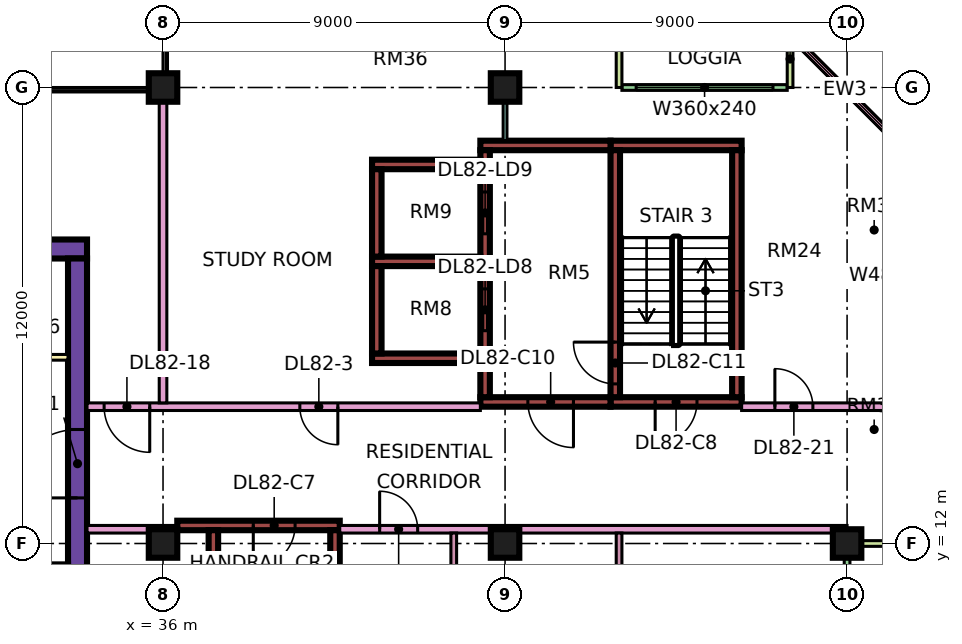
"""IFC4 building model, lengths in metres.
Left out: names, types, materials, properties, quantities, classifications, styles, units other than length and angle.
Written with IfcOpenShell. Run it as: python <this file> out.ifc"""

import sys

from ifc_helpers import new_model, si_unit, direction, frame, frame_2d, origin, origin_2d, place, context, subcontext, project, spatial, rectangle, extrude, element, fill, save


model = new_model("IFC4")
c1 = context("Model", 3, precision=1e-05, world=origin(), true_north=direction((0.0, 1.0)))
c2 = subcontext(c1, "Body", "Model", "MODEL_VIEW")
j1 = project(units=[si_unit("LENGTHUNIT", "METRE"), si_unit("PLANEANGLEUNIT", "RADIAN")], contexts=[c1])
p1 = place(None, origin())
s1 = spatial("IfcSite", under=j1, at=p1, CompositionType="ELEMENT")
p2 = place(p1, origin())
s2 = spatial("IfcBuilding", under=s1, at=p2, CompositionType="ELEMENT")
p3 = place(p2, frame((0.0, 0.0, 353.9)))
s3 = spatial("IfcBuildingStorey", under=s2, at=p3, CompositionType="ELEMENT", Elevation=353.9)
for number, where, z_axis, x_axis in (
    (1, (36.0, 12.0, 0.0), (0.0, 0.0, 1.0), (1.0, 0.0, 0.0)),
    (2, (36.0, 24.0, 0.0), (0.0, 0.0, 1.0), (1.0, 0.0, 0.0)),
    (3, (45.0, 12.0, 0.0), (0.0, 0.0, 1.0), (1.0, 0.0, 0.0)),
    (4, (45.0, 24.0, 0.0), (0.0, 0.0, 1.0), (1.0, 0.0, 0.0)),
    (5, (54.0, 12.0, 0.0), (0.0, 0.0, 1.0), (1.0, 0.0, 0.0)),
):
    element("IfcColumn", number, at=place(p3, frame(where, z_axis=z_axis, x_axis=x_axis)), inside=s3, PredefinedType="COLUMN", context=c2, shape_type="SweptSolid", body=[
        extrude(rectangle(XDim=0.75, YDim=0.75, at=origin_2d()), origin(), (0.0, 0.0, 1.0), 3.75),
    ])
p4 = place(p3, frame((9.0, 19.75, 0.0), z_axis=(0.0, 0.0, 1.0), x_axis=(1.0, 0.0, 0.0)))
e6 = element("IfcWall", 6, at=p4, inside=s3, PredefinedType="SHEAR", context=c2, shape_type="SweptSolid", body=[
    extrude(rectangle(XDim=25.0, YDim=0.5, at=frame_2d((12.5, 0.0))), origin(), (0.0, 0.0, 1.0), 3.75),
])
p5 = place(p4, frame((19.1, 0.0, 0.0)))
e7 = element("IfcOpeningElement", 7, at=p5, cuts=e6, PredefinedType="OPENING", context=c2, shape_type="SweptSolid", body=[
    extrude(rectangle(XDim=1.8, YDim=2.4, at=frame_2d((0.9, 1.2))), frame((0.0, 0.26, 0.0), z_axis=(0.0, -1.0, 0.0), x_axis=(1.0, 0.0, 0.0)), (0.0, 0.0, 1.0), 0.52),
])
p6 = place(p3, frame((33.75, 7.5, 0.0), z_axis=(0.0, 0.0, 1.0), x_axis=(0.0, 1.0, 0.0)))
e8 = element("IfcWall", 8, at=p6, inside=s3, PredefinedType="SHEAR", context=c2, shape_type="SweptSolid", body=[
    extrude(rectangle(XDim=12.0, YDim=0.5, at=frame_2d((6.0, 0.0))), origin(), (0.0, 0.0, 1.0), 3.75),
])
p7 = place(p6, frame((5.7, 0.0, 0.0)))
e9 = element("IfcOpeningElement", 9, at=p7, cuts=e8, PredefinedType="OPENING", context=c2, shape_type="SweptSolid", body=[
    extrude(rectangle(XDim=1.8, YDim=2.4, at=frame_2d((0.9, 1.2))), frame((0.0, 0.26, 0.0), z_axis=(0.0, -1.0, 0.0), x_axis=(1.0, 0.0, 0.0)), (0.0, 0.0, 1.0), 0.52),
])
p8 = place(p3, frame((36.375, 12.475, 0.0), z_axis=(0.0, 0.0, 1.0), x_axis=(1.0, 0.0, 0.0)))
e10 = element("IfcWall", 10, at=p8, inside=s3, PredefinedType="SHEAR", context=c2, shape_type="SweptSolid", body=[
    extrude(rectangle(XDim=4.275, YDim=0.25, at=frame_2d((2.137, 0.0))), origin(), (0.0, 0.0, 1.0), 3.75),
])
p9 = place(p8, frame((2.0, 0.0, 0.0)))
e11 = element("IfcOpeningElement", 11, at=p9, cuts=e10, PredefinedType="OPENING", context=c2, shape_type="SweptSolid", body=[
    extrude(rectangle(XDim=1.1, YDim=2.2, at=frame_2d((0.55, 1.1))), frame((0.0, 0.135, 0.0), z_axis=(0.0, -1.0, 0.0), x_axis=(1.0, 0.0, 0.0)), (0.0, 0.0, 1.0), 0.27),
])
for number, where, z_axis, x_axis in (
    (12, (37.325, 5.85, 0.0), (0.0, 0.0, 1.0), (0.0, 1.0, 0.0)),
    (13, (40.525, 5.85, 0.0), (0.0, 0.0, 1.0), (0.0, 1.0, 0.0)),
):
    element("IfcWall", number, at=place(p3, frame(where, z_axis=z_axis, x_axis=x_axis)), inside=s3, PredefinedType="SHEAR", context=c2, shape_type="SweptSolid", body=[
        extrude(rectangle(XDim=6.5, YDim=0.25, at=frame_2d((3.25, 0.0))), origin(), (0.0, 0.0, 1.0), 3.75),
    ])
p10 = place(p3, frame((47.775, 15.725, 0.0), z_axis=(0.0, 0.0, 1.0), x_axis=(1.0, 0.0, 0.0)))
e14 = element("IfcWall", 14, at=p10, inside=s3, PredefinedType="SHEAR", context=c2, shape_type="SweptSolid", body=[
    extrude(rectangle(XDim=3.45, YDim=0.25, at=frame_2d((1.725, 0.0))), origin(), (0.0, 0.0, 1.0), 3.75),
])
p11 = place(p10, frame((1.175, 0.0, 0.0)))
e15 = element("IfcOpeningElement", 15, at=p11, cuts=e14, PredefinedType="OPENING", context=c2, shape_type="SweptSolid", body=[
    extrude(rectangle(XDim=1.1, YDim=2.2, at=frame_2d((0.55, 1.1))), frame((0.0, 0.135, 0.0), z_axis=(0.0, -1.0, 0.0), x_axis=(1.0, 0.0, 0.0)), (0.0, 0.0, 1.0), 0.27),
])
p12 = place(p3, frame((47.775, 22.475, 0.0), z_axis=(0.0, 0.0, 1.0), x_axis=(1.0, 0.0, 0.0)))
e16 = element("IfcWall", 16, at=p12, inside=s3, PredefinedType="SHEAR", context=c2, shape_type="SweptSolid", body=[
    extrude(rectangle(XDim=3.45, YDim=0.25, at=frame_2d((1.725, 0.0))), origin(), (0.0, 0.0, 1.0), 3.75),
])
p13 = place(p3, frame((47.9, 15.85, 0.0), z_axis=(0.0, 0.0, 1.0), x_axis=(0.0, 1.0, 0.0)))
e17 = element("IfcWall", 17, at=p13, inside=s3, PredefinedType="SHEAR", context=c2, shape_type="SweptSolid", body=[
    extrude(rectangle(XDim=6.5, YDim=0.25, at=frame_2d((3.25, 0.0))), origin(), (0.0, 0.0, 1.0), 3.75),
])
p14 = place(p13, frame((0.35, 0.0, 0.0)))
e18 = element("IfcOpeningElement", 18, at=p14, cuts=e17, PredefinedType="OPENING", context=c2, shape_type="SweptSolid", body=[
    extrude(rectangle(XDim=1.1, YDim=2.2, at=frame_2d((0.55, 1.1))), frame((0.0, 0.135, 0.0), z_axis=(0.0, -1.0, 0.0), x_axis=(1.0, 0.0, 0.0)), (0.0, 0.0, 1.0), 0.27),
])
p15 = place(p3, frame((51.1, 15.85, 0.0), z_axis=(0.0, 0.0, 1.0), x_axis=(0.0, 1.0, 0.0)))
e19 = element("IfcWall", 19, at=p15, inside=s3, PredefinedType="SHEAR", context=c2, shape_type="SweptSolid", body=[
    extrude(rectangle(XDim=6.5, YDim=0.25, at=frame_2d((3.25, 0.0))), origin(), (0.0, 0.0, 1.0), 3.75),
])
p16 = place(p3, frame((44.35, 15.725, 0.0), z_axis=(0.0, 0.0, 1.0), x_axis=(1.0, 0.0, 0.0)))
e20 = element("IfcWall", 20, at=p16, inside=s3, PredefinedType="SHEAR", context=c2, shape_type="SweptSolid", body=[
    extrude(rectangle(XDim=3.425, YDim=0.25, at=frame_2d((1.712, 0.0))), origin(), (0.0, 0.0, 1.0), 3.75),
])
p17 = place(p16, frame((1.25, 0.0, 0.0)))
e21 = element("IfcOpeningElement", 21, at=p17, cuts=e20, PredefinedType="OPENING", context=c2, shape_type="SweptSolid", body=[
    extrude(rectangle(XDim=1.2, YDim=2.2, at=frame_2d((0.6, 1.1))), frame((0.0, 0.135, 0.0), z_axis=(0.0, -1.0, 0.0), x_axis=(1.0, 0.0, 0.0)), (0.0, 0.0, 1.0), 0.27),
])
p18 = place(p3, frame((44.35, 22.475, 0.0), z_axis=(0.0, 0.0, 1.0), x_axis=(1.0, 0.0, 0.0)))
e22 = element("IfcWall", 22, at=p18, inside=s3, PredefinedType="SHEAR", context=c2, shape_type="SweptSolid", body=[
    extrude(rectangle(XDim=3.425, YDim=0.25, at=frame_2d((1.712, 0.0))), origin(), (0.0, 0.0, 1.0), 3.75),
])
p19 = place(p3, frame((44.475, 15.85, 0.0), z_axis=(0.0, 0.0, 1.0), x_axis=(0.0, 1.0, 0.0)))
e23 = element("IfcWall", 23, at=p19, inside=s3, PredefinedType="SHEAR", context=c2, shape_type="SweptSolid", body=[
    extrude(rectangle(XDim=6.5, YDim=0.25, at=frame_2d((3.25, 0.0))), origin(), (0.0, 0.0, 1.0), 3.75),
])
p20 = place(p19, frame((1.75, 0.0, 0.0)))
e24 = element("IfcOpeningElement", 24, at=p20, cuts=e23, PredefinedType="OPENING", context=c2, shape_type="SweptSolid", body=[
    extrude(rectangle(XDim=1.1, YDim=2.2, at=frame_2d((0.55, 1.1))), frame((0.0, 0.135, 0.0), z_axis=(0.0, -1.0, 0.0), x_axis=(1.0, 0.0, 0.0)), (0.0, 0.0, 1.0), 0.27),
])
p21 = place(p19, frame((4.3, 0.0, 0.0)))
e25 = element("IfcOpeningElement", 25, at=p21, cuts=e23, PredefinedType="OPENING", context=c2, shape_type="SweptSolid", body=[
    extrude(rectangle(XDim=1.1, YDim=2.2, at=frame_2d((0.55, 1.1))), frame((0.0, 0.135, 0.0), z_axis=(0.0, -1.0, 0.0), x_axis=(1.0, 0.0, 0.0)), (0.0, 0.0, 1.0), 0.27),
])
for number, where, z_axis, x_axis in (
    (26, (41.5, 16.875, 0.0), (0.0, 0.0, 1.0), (1.0, 0.0, 0.0)),
    (27, (41.5, 19.425, 0.0), (0.0, 0.0, 1.0), (1.0, 0.0, 0.0)),
    (28, (41.5, 21.975, 0.0), (0.0, 0.0, 1.0), (1.0, 0.0, 0.0)),
):
    element("IfcWall", number, at=place(p3, frame(where, z_axis=z_axis, x_axis=x_axis)), inside=s3, PredefinedType="SHEAR", context=c2, shape_type="SweptSolid", body=[
        extrude(rectangle(XDim=2.85, YDim=0.25, at=frame_2d((1.425, 0.0))), origin(), (0.0, 0.0, 1.0), 3.75),
    ])
for number, where, z_axis, x_axis in (
    (29, (41.625, 17.0, 0.0), (0.0, 0.0, 1.0), (0.0, 1.0, 0.0)),
    (30, (41.625, 19.55, 0.0), (0.0, 0.0, 1.0), (0.0, 1.0, 0.0)),
):
    element("IfcWall", number, at=place(p3, frame(where, z_axis=z_axis, x_axis=x_axis)), inside=s3, PredefinedType="SHEAR", context=c2, shape_type="SweptSolid", body=[
        extrude(rectangle(XDim=2.3, YDim=0.25, at=frame_2d((1.15, 0.0))), origin(), (0.0, 0.0, 1.0), 3.75),
    ])
p22 = place(p3, frame((52.425, 24.0, 0.0), z_axis=(0.0, 0.0, 1.0), x_axis=(-1.0, 0.0, 0.0)))
e31 = element("IfcWall", 31, at=p22, inside=s3, PredefinedType="SOLIDWALL", context=c2, shape_type="SweptSolid", body=[
    extrude(rectangle(XDim=4.35, YDim=0.15, at=frame_2d((2.175, 0.0))), origin(), (0.0, 0.0, 1.0), 3.35),
])
p23 = place(p22, frame((0.375, 0.0, 0.45)))
e32 = element("IfcOpeningElement", 32, at=p23, cuts=e31, PredefinedType="OPENING", context=c2, shape_type="SweptSolid", body=[
    extrude(rectangle(XDim=3.6, YDim=2.4, at=frame_2d((1.8, 1.2))), frame((0.0, 0.085, 0.0), z_axis=(0.0, -1.0, 0.0), x_axis=(1.0, 0.0, 0.0)), (0.0, 0.0, 1.0), 0.17),
])
for number, where, z_axis, x_axis in (
    (33, (52.5, 25.5, 0.0), (0.0, 0.0, 1.0), (0.0, -1.0, 0.0)),
    (34, (48.0, 25.5, 0.0), (0.0, 0.0, 1.0), (0.0, -1.0, 0.0)),
):
    element("IfcWall", number, at=place(p3, frame(where, z_axis=z_axis, x_axis=x_axis)), inside=s3, PredefinedType="SOLIDWALL", context=c2, shape_type="SweptSolid", body=[
        extrude(rectangle(XDim=1.5, YDim=0.15, at=frame_2d((0.75, 0.0))), origin(), (0.0, 0.0, 1.0), 3.35),
    ])
p24 = place(p3, frame((54.0, 1.575, 0.0), z_axis=(0.0, 0.0, 1.0), x_axis=(0.0, 1.0, 0.0)))
e35 = element("IfcWall", 35, at=p24, inside=s3, PredefinedType="SOLIDWALL", context=c2, shape_type="SweptSolid", body=[
    extrude(rectangle(XDim=10.35, YDim=0.15, at=frame_2d((5.175, 0.0))), origin(), (0.0, 0.0, 1.0), 3.35),
])
p25 = place(p24, frame((0.663, 0.0, 0.0)))
e36 = element("IfcOpeningElement", 36, at=p25, cuts=e35, PredefinedType="OPENING", context=c2, shape_type="SweptSolid", body=[
    extrude(rectangle(XDim=1.8, YDim=2.4, at=frame_2d((0.9, 1.2))), frame((0.0, 0.085, 0.0), z_axis=(0.0, -1.0, 0.0), x_axis=(1.0, 0.0, 0.0)), (0.0, 0.0, 1.0), 0.17),
])
p26 = place(p24, frame((5.637, 0.0, 0.45)))
e37 = element("IfcOpeningElement", 37, at=p26, cuts=e35, PredefinedType="OPENING", context=c2, shape_type="SweptSolid", body=[
    extrude(rectangle(XDim=3.0, YDim=2.4, at=frame_2d((1.5, 1.2))), frame((0.0, 0.085, 0.0), z_axis=(0.0, -1.0, 0.0), x_axis=(1.0, 0.0, 0.0)), (0.0, 0.0, 1.0), 0.17),
])
p27 = place(p3, frame((55.5, 12.0, 0.0), z_axis=(0.0, 0.0, 1.0), x_axis=(-1.0, 0.0, 0.0)))
e38 = element("IfcWall", 38, at=p27, inside=s3, PredefinedType="SOLIDWALL", context=c2, shape_type="SweptSolid", body=[
    extrude(rectangle(XDim=1.5, YDim=0.15, at=frame_2d((0.75, 0.0))), origin(), (0.0, 0.0, 1.0), 3.35),
])
p28 = place(p3, frame((55.447, 22.447, 0.0), z_axis=(0.0, 0.0, 1.0), x_axis=(-0.707106781187, 0.707106781187, 0.0)))
e39 = element("IfcWall", 39, at=p28, inside=s3, PredefinedType="SOLIDWALL", context=c2, shape_type="SweptSolid", body=[
    extrude(rectangle(XDim=4.243, YDim=0.15, at=frame_2d((2.121, 0.0))), origin(), (0.0, 0.0, 1.0), 3.35),
])
p29 = place(p28, frame((0.621, 0.0, 0.45)))
e40 = element("IfcOpeningElement", 40, at=p29, cuts=e39, PredefinedType="OPENING", context=c2, shape_type="SweptSolid", body=[
    extrude(rectangle(XDim=3.0, YDim=2.4, at=frame_2d((1.5, 1.2))), frame((0.0, 0.085, 0.0), z_axis=(0.0, -1.0, 0.0), x_axis=(1.0, 0.0, 0.0)), (0.0, 0.0, 1.0), 0.17),
])
p30 = place(p3, frame((31.1, 16.9, 0.0), z_axis=(0.0, 0.0, 1.0), x_axis=(1.0, 0.0, 0.0)))
e41 = element("IfcWall", 41, at=p30, inside=s3, PredefinedType="PARTITIONING", context=c2, shape_type="SweptSolid", body=[
    extrude(rectangle(XDim=2.4, YDim=0.15, at=frame_2d((1.2, 0.0))), origin(), (0.0, 0.0, 1.0), 3.35),
])
p31 = place(p3, frame((34.0, 12.375, 0.0), z_axis=(0.0, 0.0, 1.0), x_axis=(1.0, 0.0, 0.0)))
e42 = element("IfcWall", 42, at=p31, inside=s3, PredefinedType="PARTITIONING", context=c2, shape_type="SweptSolid", body=[
    extrude(rectangle(XDim=2.376, YDim=0.2, at=frame_2d((1.188, 0.0))), origin(), (0.0, 0.0, 1.0), 3.35),
])
p32 = place(p3, frame((34.0, 15.6, 0.0), z_axis=(0.0, 0.0, 1.0), x_axis=(1.0, 0.0, 0.0)))
e43 = element("IfcWall", 43, at=p32, inside=s3, PredefinedType="PARTITIONING", context=c2, shape_type="SweptSolid", body=[
    extrude(rectangle(XDim=10.35, YDim=0.2, at=frame_2d((5.175, 0.0))), origin(), (0.0, 0.0, 1.0), 3.35),
])
p33 = place(p32, frame((5.6, 0.0, 0.0)))
e44 = element("IfcOpeningElement", 44, at=p33, cuts=e43, PredefinedType="OPENING", context=c2, shape_type="SweptSolid", body=[
    extrude(rectangle(XDim=1.0, YDim=2.1, at=frame_2d((0.5, 1.05))), frame((0.0, 0.11, 0.0), z_axis=(0.0, -1.0, 0.0), x_axis=(1.0, 0.0, 0.0)), (0.0, 0.0, 1.0), 0.22),
])
p34 = place(p32, frame((0.45, 0.0, 0.0)))
e45 = element("IfcOpeningElement", 45, at=p34, cuts=e43, PredefinedType="OPENING", context=c2, shape_type="SweptSolid", body=[
    extrude(rectangle(XDim=1.2, YDim=2.1, at=frame_2d((0.6, 1.05))), frame((0.0, 0.11, 0.0), z_axis=(0.0, -1.0, 0.0), x_axis=(1.0, 0.0, 0.0)), (0.0, 0.0, 1.0), 0.22),
])
p35 = place(p3, frame((36.0, 15.7, 0.0), z_axis=(0.0, 0.0, 1.0), x_axis=(0.0, 1.0, 0.0)))
e46 = element("IfcWall", 46, at=p35, inside=s3, PredefinedType="PARTITIONING", context=c2, shape_type="SweptSolid", body=[
    extrude(rectangle(XDim=8.3, YDim=0.2, at=frame_2d((4.15, 0.0))), origin(), (0.0, 0.0, 1.0), 3.35),
])
p36 = place(p3, frame((40.65, 12.375, 0.0), z_axis=(0.0, 0.0, 1.0), x_axis=(1.0, 0.0, 0.0)))
e47 = element("IfcWall", 47, at=p36, inside=s3, PredefinedType="PARTITIONING", context=c2, shape_type="SweptSolid", body=[
    extrude(rectangle(XDim=13.35, YDim=0.2, at=frame_2d((6.675, 0.0))), origin(), (0.0, 0.0, 1.0), 3.35),
])
p37 = place(p36, frame((1.05, 0.0, 0.0)))
e48 = element("IfcOpeningElement", 48, at=p37, cuts=e47, PredefinedType="OPENING", context=c2, shape_type="SweptSolid", body=[
    extrude(rectangle(XDim=1.0, YDim=2.1, at=frame_2d((0.5, 1.05))), frame((0.0, 0.11, 0.0), z_axis=(0.0, -1.0, 0.0), x_axis=(1.0, 0.0, 0.0)), (0.0, 0.0, 1.0), 0.22),
])
p38 = place(p3, frame((43.65, 5.975, 0.0), z_axis=(0.0, 0.0, 1.0), x_axis=(0.0, 1.0, 0.0)))
e49 = element("IfcWall", 49, at=p38, inside=s3, PredefinedType="PARTITIONING", context=c2, shape_type="SweptSolid", body=[
    extrude(rectangle(XDim=6.3, YDim=0.15, at=frame_2d((3.15, 0.0))), origin(), (0.0, 0.0, 1.0), 3.35),
])
p39 = place(p38, frame((4.275, 0.0, 0.0)))
e50 = element("IfcOpeningElement", 50, at=p39, cuts=e49, PredefinedType="OPENING", context=c2, shape_type="SweptSolid", body=[
    extrude(rectangle(XDim=0.9, YDim=2.1, at=frame_2d((0.45, 1.05))), frame((0.0, 0.085, 0.0), z_axis=(0.0, -1.0, 0.0), x_axis=(1.0, 0.0, 0.0)), (0.0, 0.0, 1.0), 0.17),
])
p40 = place(p3, frame((45.0, 22.6, 0.0), z_axis=(0.0, 0.0, 1.0), x_axis=(0.0, 1.0, 0.0)))
e51 = element("IfcWall", 51, at=p40, inside=s3, PredefinedType="PARTITIONING", context=c2, shape_type="SweptSolid", body=[
    extrude(rectangle(XDim=1.4, YDim=0.1, at=frame_2d((0.7, 0.0))), origin(), (0.0, 0.0, 1.0), 3.35),
])
p41 = place(p3, frame((48.0, 5.975, 0.0), z_axis=(0.0, 0.0, 1.0), x_axis=(0.0, 1.0, 0.0)))
e52 = element("IfcWall", 52, at=p41, inside=s3, PredefinedType="PARTITIONING", context=c2, shape_type="SweptSolid", body=[
    extrude(rectangle(XDim=6.3, YDim=0.15, at=frame_2d((3.15, 0.0))), origin(), (0.0, 0.0, 1.0), 3.35),
])
p42 = place(p3, frame((51.225, 15.6, 0.0), z_axis=(0.0, 0.0, 1.0), x_axis=(1.0, 0.0, 0.0)))
e53 = element("IfcWall", 53, at=p42, inside=s3, PredefinedType="PARTITIONING", context=c2, shape_type="SweptSolid", body=[
    extrude(rectangle(XDim=4.125, YDim=0.2, at=frame_2d((2.062, 0.0))), origin(), (0.0, 0.0, 1.0), 3.35),
])
p43 = place(p42, frame((0.875, 0.0, 0.0)))
e54 = element("IfcOpeningElement", 54, at=p43, cuts=e53, PredefinedType="OPENING", context=c2, shape_type="SweptSolid", body=[
    extrude(rectangle(XDim=1.0, YDim=2.1, at=frame_2d((0.5, 1.05))), frame((0.0, 0.11, 0.0), z_axis=(0.0, -1.0, 0.0), x_axis=(1.0, 0.0, 0.0)), (0.0, 0.0, 1.0), 0.22),
])
p44 = place(p23, origin())
e55 = element("IfcWindow", 55, at=p44, inside=s3, PartitioningType="SINGLE_PANEL", PredefinedType="WINDOW", context=c2, shape_type="SweptSolid", body=[
    extrude(rectangle(XDim=3.6, YDim=2.4, at=frame_2d((1.8, 1.2))), frame((0.0, 0.03, 0.0), z_axis=(0.0, -1.0, 0.0), x_axis=(1.0, 0.0, 0.0)), (0.0, 0.0, 1.0), 0.06),
])
fill(e32, e55)
p45 = place(p29, origin())
e56 = element("IfcWindow", 56, at=p45, inside=s3, PartitioningType="SINGLE_PANEL", PredefinedType="WINDOW", context=c2, shape_type="SweptSolid", body=[
    extrude(rectangle(XDim=3.0, YDim=2.4, at=frame_2d((1.5, 1.2))), frame((0.0, 0.03, 0.0), z_axis=(0.0, -1.0, 0.0), x_axis=(1.0, 0.0, 0.0)), (0.0, 0.0, 1.0), 0.06),
])
fill(e40, e56)
p46 = place(p7, origin())
e57 = element("IfcDoor", 57, at=p46, inside=s3, OperationType="DOUBLE_DOOR_SINGLE_SWING", PredefinedType="DOOR", context=c2, shape_type="SweptSolid", body=[
    extrude(rectangle(XDim=1.8, YDim=2.4, at=frame_2d((0.9, 1.2))), frame((0.0, 0.025, 0.0), z_axis=(0.0, -1.0, 0.0), x_axis=(1.0, 0.0, 0.0)), (0.0, 0.0, 1.0), 0.05),
])
fill(e9, e57)
p47 = place(p9, frame((1.1, 0.0, 0.0), z_axis=(0.0, 0.0, 1.0), x_axis=(-1.0, 0.0, 0.0)))
e58 = element("IfcDoor", 58, at=p47, inside=s3, OperationType="SINGLE_SWING_LEFT", PredefinedType="DOOR", context=c2, shape_type="SweptSolid", body=[
    extrude(rectangle(XDim=1.1, YDim=2.2, at=frame_2d((0.55, 1.1))), frame((0.0, 0.025, 0.0), z_axis=(0.0, -1.0, 0.0), x_axis=(1.0, 0.0, 0.0)), (0.0, 0.0, 1.0), 0.05),
])
fill(e11, e58)
p48 = place(p11, frame((1.1, 0.0, 0.0), z_axis=(0.0, 0.0, 1.0), x_axis=(-1.0, 0.0, 0.0)))
e59 = element("IfcDoor", 59, at=p48, inside=s3, OperationType="SINGLE_SWING_LEFT", PredefinedType="DOOR", context=c2, shape_type="SweptSolid", body=[
    extrude(rectangle(XDim=1.1, YDim=2.2, at=frame_2d((0.55, 1.1))), frame((0.0, 0.025, 0.0), z_axis=(0.0, -1.0, 0.0), x_axis=(1.0, 0.0, 0.0)), (0.0, 0.0, 1.0), 0.05),
])
fill(e15, e59)
p49 = place(p17, origin())
e60 = element("IfcDoor", 60, at=p49, inside=s3, OperationType="SINGLE_SWING_RIGHT", PredefinedType="DOOR", context=c2, shape_type="SweptSolid", body=[
    extrude(rectangle(XDim=1.2, YDim=2.2, at=frame_2d((0.6, 1.1))), frame((0.0, 0.025, 0.0), z_axis=(0.0, -1.0, 0.0), x_axis=(1.0, 0.0, 0.0)), (0.0, 0.0, 1.0), 0.05),
])
fill(e21, e60)
p50 = place(p14, frame((1.1, 0.0, 0.0), z_axis=(0.0, 0.0, 1.0), x_axis=(-1.0, 0.0, 0.0)))
e61 = element("IfcDoor", 61, at=p50, inside=s3, OperationType="SINGLE_SWING_RIGHT", PredefinedType="DOOR", context=c2, shape_type="SweptSolid", body=[
    extrude(rectangle(XDim=1.1, YDim=2.2, at=frame_2d((0.55, 1.1))), frame((0.0, 0.025, 0.0), z_axis=(0.0, -1.0, 0.0), x_axis=(1.0, 0.0, 0.0)), (0.0, 0.0, 1.0), 0.05),
])
fill(e18, e61)
p51 = place(p20, origin())
e62 = element("IfcDoor", 62, at=p51, inside=s3, OperationType="DOUBLE_DOOR_SLIDING", PredefinedType="DOOR", context=c2, shape_type="SweptSolid", body=[
    extrude(rectangle(XDim=1.1, YDim=2.2, at=frame_2d((0.55, 1.1))), frame((0.0, 0.025, 0.0), z_axis=(0.0, -1.0, 0.0), x_axis=(1.0, 0.0, 0.0)), (0.0, 0.0, 1.0), 0.05),
])
fill(e24, e62)
p52 = place(p21, origin())
e63 = element("IfcDoor", 63, at=p52, inside=s3, OperationType="DOUBLE_DOOR_SLIDING", PredefinedType="DOOR", context=c2, shape_type="SweptSolid", body=[
    extrude(rectangle(XDim=1.1, YDim=2.2, at=frame_2d((0.55, 1.1))), frame((0.0, 0.025, 0.0), z_axis=(0.0, -1.0, 0.0), x_axis=(1.0, 0.0, 0.0)), (0.0, 0.0, 1.0), 0.05),
])
fill(e25, e63)
p53 = place(p33, origin())
e64 = element("IfcDoor", 64, at=p53, inside=s3, OperationType="SINGLE_SWING_RIGHT", PredefinedType="DOOR", context=c2, shape_type="SweptSolid", body=[
    extrude(rectangle(XDim=1.0, YDim=2.1, at=frame_2d((0.5, 1.05))), frame((0.0, 0.025, 0.0), z_axis=(0.0, -1.0, 0.0), x_axis=(1.0, 0.0, 0.0)), (0.0, 0.0, 1.0), 0.05),
])
fill(e44, e64)
p54 = place(p34, origin())
e65 = element("IfcDoor", 65, at=p54, inside=s3, OperationType="SINGLE_SWING_RIGHT", PredefinedType="DOOR", context=c2, shape_type="SweptSolid", body=[
    extrude(rectangle(XDim=1.2, YDim=2.1, at=frame_2d((0.6, 1.05))), frame((0.0, 0.025, 0.0), z_axis=(0.0, -1.0, 0.0), x_axis=(1.0, 0.0, 0.0)), (0.0, 0.0, 1.0), 0.05),
])
fill(e45, e65)
p55 = place(p43, origin())
e66 = element("IfcDoor", 66, at=p55, inside=s3, OperationType="SINGLE_SWING_LEFT", PredefinedType="DOOR", context=c2, shape_type="SweptSolid", body=[
    extrude(rectangle(XDim=1.0, YDim=2.1, at=frame_2d((0.5, 1.05))), frame((0.0, 0.025, 0.0), z_axis=(0.0, -1.0, 0.0), x_axis=(1.0, 0.0, 0.0)), (0.0, 0.0, 1.0), 0.05),
])
fill(e54, e66)
p56 = place(p37, origin())
e67 = element("IfcDoor", 67, at=p56, inside=s3, OperationType="SINGLE_SWING_LEFT", PredefinedType="DOOR", context=c2, shape_type="SweptSolid", body=[
    extrude(rectangle(XDim=1.0, YDim=2.1, at=frame_2d((0.5, 1.05))), frame((0.0, 0.025, 0.0), z_axis=(0.0, -1.0, 0.0), x_axis=(1.0, 0.0, 0.0)), (0.0, 0.0, 1.0), 0.05),
])
fill(e48, e67)
save(model, sys.argv[1])
